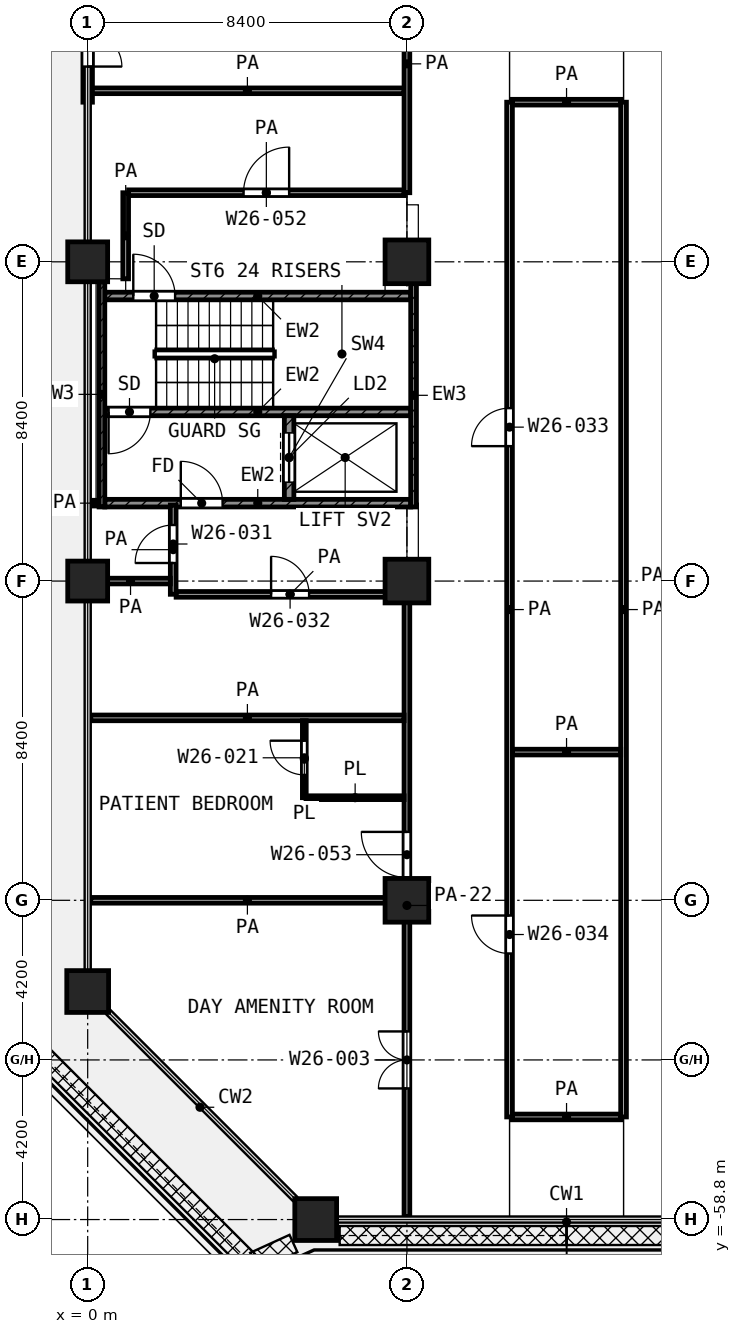
"""IFC4 building model, lengths in metres.
Left out: names, types, materials, properties, quantities, classifications, styles, units other than length and angle.
Written with IfcOpenShell. Run it as: python <this file> out.ifc"""

import sys

from ifc_helpers import new_model, si_unit, direction, frame, frame_2d, origin, origin_2d, place, context, subcontext, project, spatial, rectangle, extrude, element, fill, save


model = new_model("IFC4")
c1 = context("Model", 3, precision=1e-05, world=origin(), true_north=direction((0.0, 1.0)))
c2 = subcontext(c1, "Body", "Model", "MODEL_VIEW")
j1 = project(units=[si_unit("LENGTHUNIT", "METRE"), si_unit("PLANEANGLEUNIT", "RADIAN")], contexts=[c1])
p1 = place(None, origin())
s1 = spatial("IfcSite", under=j1, at=p1, CompositionType="ELEMENT")
p2 = place(p1, origin())
s2 = spatial("IfcBuilding", under=s1, at=p2, CompositionType="ELEMENT")
p3 = place(p2, frame((0.0, 0.0, 136.6)))
s3 = spatial("IfcBuildingStorey", under=s2, at=p3, CompositionType="ELEMENT", Elevation=136.6)
p4 = place(p3, frame((0.0, -33.6, 0.0), z_axis=(0.0, 0.0, 1.0), x_axis=(1.0, 0.0, 0.0)))
e1 = element("IfcColumn", 1, at=p4, inside=s3, PredefinedType="COLUMN", context=c2, shape_type="SweptSolid", body=[
    extrude(rectangle(XDim=1.05, YDim=1.05, at=origin_2d()), origin(), (0.0, 0.0, 1.0), 4.2),
])
p5 = place(p3, frame((8.4, -33.6, 0.0), z_axis=(0.0, 0.0, 1.0), x_axis=(1.0, 0.0, 0.0)))
e2 = element("IfcColumn", 2, at=p5, inside=s3, PredefinedType="COLUMN", context=c2, shape_type="SweptSolid", body=[
    extrude(rectangle(XDim=1.15, YDim=1.15, at=origin_2d()), origin(), (0.0, 0.0, 1.0), 4.2),
])
p6 = place(p3, frame((0.0, -42.0, 0.0), z_axis=(0.0, 0.0, 1.0), x_axis=(1.0, 0.0, 0.0)))
e3 = element("IfcColumn", 3, at=p6, inside=s3, PredefinedType="COLUMN", context=c2, shape_type="SweptSolid", body=[
    extrude(rectangle(XDim=1.05, YDim=1.05, at=origin_2d()), origin(), (0.0, 0.0, 1.0), 4.2),
])
for number, where, z_axis, x_axis in (
    (4, (8.4, -42.0, 0.0), (0.0, 0.0, 1.0), (1.0, 0.0, 0.0)),
    (5, (8.4, -50.4, 0.0), (0.0, 0.0, 1.0), (1.0, 0.0, 0.0)),
):
    element("IfcColumn", number, at=place(p3, frame(where, z_axis=z_axis, x_axis=x_axis)), inside=s3, PredefinedType="COLUMN", context=c2, shape_type="SweptSolid", body=[
        extrude(rectangle(XDim=1.15, YDim=1.15, at=origin_2d()), origin(), (0.0, 0.0, 1.0), 4.2),
    ])
for number, where, z_axis, x_axis in (
    (6, (0.0, -52.8, 0.0), (0.0, 0.0, 1.0), (1.0, 0.0, 0.0)),
    (7, (6.0, -58.8, 0.0), (0.0, 0.0, 1.0), (1.0, 0.0, 0.0)),
):
    element("IfcColumn", number, at=place(p3, frame(where, z_axis=z_axis, x_axis=x_axis)), inside=s3, PredefinedType="COLUMN", context=c2, shape_type="SweptSolid", body=[
        extrude(rectangle(XDim=1.1, YDim=1.1, at=origin_2d()), origin(), (0.0, 0.0, 1.0), 4.2),
    ])
p7 = place(p3, frame((0.0, -25.725, 0.0), z_axis=(0.0, 0.0, 1.0), x_axis=(0.0, -1.0, 0.0)))
e8 = element("IfcWall", 8, at=p7, inside=s3, PredefinedType="SOLIDWALL", context=c2, shape_type="SweptSolid", body=[
    extrude(rectangle(XDim=3.675, YDim=0.25, at=frame_2d((1.837, 0.0))), origin(), (0.0, 0.0, 1.0), 3.48),
])
p8 = place(p7, frame((0.938, 0.0, 0.0)))
e9 = element("IfcOpeningElement", 9, at=p8, cuts=e8, PredefinedType="OPENING", context=c2, shape_type="SweptSolid", body=[
    extrude(rectangle(XDim=1.8, YDim=2.1, at=frame_2d((0.9, 1.05))), frame((0.0, 0.135, 0.0), z_axis=(0.0, -1.0, 0.0), x_axis=(1.0, 0.0, 0.0)), (0.0, 0.0, 1.0), 0.27),
])
p9 = place(p3, frame((0.375, -40.05, 0.0), z_axis=(0.0, 0.0, 1.0), x_axis=(0.0, 1.0, 0.0)))
e10 = element("IfcWall", 10, at=p9, inside=s3, PredefinedType="SHEAR", context=c2, shape_type="SweptSolid", body=[
    extrude(rectangle(XDim=5.925, YDim=0.15, at=frame_2d((2.962, 0.0))), origin(), (0.0, 0.0, 1.0), 3.6),
])
p10 = place(p3, frame((8.575, -40.05, 0.0), z_axis=(0.0, 0.0, 1.0), x_axis=(0.0, 1.0, 0.0)))
e11 = element("IfcWall", 11, at=p10, inside=s3, PredefinedType="SHEAR", context=c2, shape_type="SweptSolid", body=[
    extrude(rectangle(XDim=5.875, YDim=0.15, at=frame_2d((2.938, 0.0))), origin(), (0.0, 0.0, 1.0), 3.6),
])
p11 = place(p3, frame((0.45, -34.5, 0.0), z_axis=(0.0, 0.0, 1.0), x_axis=(1.0, 0.0, 0.0)))
e12 = element("IfcWall", 12, at=p11, inside=s3, PredefinedType="SHEAR", context=c2, shape_type="SweptSolid", body=[
    extrude(rectangle(XDim=8.05, YDim=0.2, at=frame_2d((4.025, 0.0))), origin(), (0.0, 0.0, 1.0), 3.6),
])
p12 = place(p11, frame((0.75, 0.0, 0.0)))
e13 = element("IfcOpeningElement", 13, at=p12, cuts=e12, PredefinedType="OPENING", context=c2, shape_type="SweptSolid", body=[
    extrude(rectangle(XDim=1.1, YDim=2.1, at=frame_2d((0.55, 1.05))), frame((0.0, 0.11, 0.0), z_axis=(0.0, -1.0, 0.0), x_axis=(1.0, 0.0, 0.0)), (0.0, 0.0, 1.0), 0.22),
])
p13 = place(p3, frame((0.45, -37.55, 0.0), z_axis=(0.0, 0.0, 1.0), x_axis=(1.0, 0.0, 0.0)))
e14 = element("IfcWall", 14, at=p13, inside=s3, PredefinedType="SHEAR", context=c2, shape_type="SweptSolid", body=[
    extrude(rectangle(XDim=8.05, YDim=0.2, at=frame_2d((4.025, 0.0))), origin(), (0.0, 0.0, 1.0), 3.6),
])
p14 = place(p13, frame((0.1, 0.0, 0.0)))
e15 = element("IfcOpeningElement", 15, at=p14, cuts=e14, PredefinedType="OPENING", context=c2, shape_type="SweptSolid", body=[
    extrude(rectangle(XDim=1.1, YDim=2.1, at=frame_2d((0.55, 1.05))), frame((0.0, 0.11, 0.0), z_axis=(0.0, -1.0, 0.0), x_axis=(1.0, 0.0, 0.0)), (0.0, 0.0, 1.0), 0.22),
])
p15 = place(p3, frame((0.45, -39.95, 0.0), z_axis=(0.0, 0.0, 1.0), x_axis=(1.0, 0.0, 0.0)))
e16 = element("IfcWall", 16, at=p15, inside=s3, PredefinedType="SHEAR", context=c2, shape_type="SweptSolid", body=[
    extrude(rectangle(XDim=8.05, YDim=0.2, at=frame_2d((4.025, 0.0))), origin(), (0.0, 0.0, 1.0), 3.6),
])
p16 = place(p15, frame((2.0, 0.0, 0.0)))
e17 = element("IfcOpeningElement", 17, at=p16, cuts=e16, PredefinedType="OPENING", context=c2, shape_type="SweptSolid", body=[
    extrude(rectangle(XDim=1.1, YDim=2.1, at=frame_2d((0.55, 1.05))), frame((0.0, 0.11, 0.0), z_axis=(0.0, -1.0, 0.0), x_axis=(1.0, 0.0, 0.0)), (0.0, 0.0, 1.0), 0.22),
])
p17 = place(p3, frame((5.3, -39.85, 0.0), z_axis=(0.0, 0.0, 1.0), x_axis=(0.0, 1.0, 0.0)))
e18 = element("IfcWall", 18, at=p17, inside=s3, PredefinedType="SHEAR", context=c2, shape_type="SweptSolid", body=[
    extrude(rectangle(XDim=2.2, YDim=0.25, at=frame_2d((1.1, 0.0))), origin(), (0.0, 0.0, 1.0), 3.6),
])
p18 = place(p17, frame((0.45, 0.0, 0.0)))
e19 = element("IfcOpeningElement", 19, at=p18, cuts=e18, PredefinedType="OPENING", context=c2, shape_type="SweptSolid", body=[
    extrude(rectangle(XDim=1.3, YDim=2.1, at=frame_2d((0.65, 1.05))), frame((0.0, 0.135, 0.0), z_axis=(0.0, -1.0, 0.0), x_axis=(1.0, 0.0, 0.0)), (0.0, 0.0, 1.0), 0.27),
])
p19 = place(p3, frame((5.75, -47.7, 0.0), z_axis=(0.0, 0.0, 1.0), x_axis=(1.0, 0.0, 0.0)))
e20 = element("IfcWall", 20, at=p19, inside=s3, PredefinedType="PARTITIONING", context=c2, shape_type="SweptSolid", body=[
    extrude(rectangle(XDim=2.575, YDim=0.1, at=frame_2d((1.288, 0.0))), origin(), (0.0, 0.0, 1.0), 3.6),
])
p20 = place(p3, frame((5.7, -47.7, 0.0), z_axis=(0.0, 0.0, 1.0), x_axis=(0.0, 1.0, 0.0)))
e21 = element("IfcWall", 21, at=p20, inside=s3, PredefinedType="PARTITIONING", context=c2, shape_type="SweptSolid", body=[
    extrude(rectangle(XDim=2.025, YDim=0.1, at=frame_2d((1.012, 0.0))), origin(), (0.0, 0.0, 1.0), 3.6),
])
p21 = place(p20, frame((0.6, 0.0, 0.0)))
e22 = element("IfcOpeningElement", 22, at=p21, cuts=e21, PredefinedType="OPENING", context=c2, shape_type="SweptSolid", body=[
    extrude(rectangle(XDim=0.9, YDim=2.1, at=frame_2d((0.45, 1.05))), frame((0.0, 0.06, 0.0), z_axis=(0.0, -1.0, 0.0), x_axis=(1.0, 0.0, 0.0)), (0.0, 0.0, 1.0), 0.12),
])
p22 = place(p3, frame((11.175, -56.1, 0.0), z_axis=(0.0, 0.0, 1.0), x_axis=(1.0, 0.0, 0.0)))
e23 = element("IfcWall", 23, at=p22, inside=s3, PredefinedType="PARTITIONING", context=c2, shape_type="SweptSolid", body=[
    extrude(rectangle(XDim=2.85, YDim=0.15, at=frame_2d((1.425, 0.0))), origin(), (0.0, 0.0, 1.0), 3.6),
])
p23 = place(p3, frame((0.08, -50.4, 0.0), z_axis=(0.0, 0.0, 1.0), x_axis=(1.0, 0.0, 0.0)))
e24 = element("IfcWall", 24, at=p23, inside=s3, PredefinedType="PARTITIONING", context=c2, shape_type="SweptSolid", body=[
    extrude(rectangle(XDim=8.245, YDim=0.15, at=frame_2d((4.123, 0.0))), origin(), (0.0, 0.0, 1.0), 3.6),
])
p24 = place(p3, frame((11.175, -46.5, 0.0), z_axis=(0.0, 0.0, 1.0), x_axis=(1.0, 0.0, 0.0)))
e25 = element("IfcWall", 25, at=p24, inside=s3, PredefinedType="PARTITIONING", context=c2, shape_type="SweptSolid", body=[
    extrude(rectangle(XDim=2.85, YDim=0.15, at=frame_2d((1.425, 0.0))), origin(), (0.0, 0.0, 1.0), 3.6),
])
p25 = place(p3, frame((0.08, -45.6, 0.0), z_axis=(0.0, 0.0, 1.0), x_axis=(1.0, 0.0, 0.0)))
e26 = element("IfcWall", 26, at=p25, inside=s3, PredefinedType="PARTITIONING", context=c2, shape_type="SweptSolid", body=[
    extrude(rectangle(XDim=8.245, YDim=0.15, at=frame_2d((4.123, 0.0))), origin(), (0.0, 0.0, 1.0), 3.6),
])
p26 = place(p3, frame((2.327, -42.35, 0.0), z_axis=(0.0, 0.0, 1.0), x_axis=(1.0, 0.0, 0.0)))
e27 = element("IfcWall", 27, at=p26, inside=s3, PredefinedType="PARTITIONING", context=c2, shape_type="SweptSolid", body=[
    extrude(rectangle(XDim=5.998, YDim=0.15, at=frame_2d((2.999, 0.0))), origin(), (0.0, 0.0, 1.0), 3.6),
])
p27 = place(p26, frame((2.499, 0.0, 0.0)))
e28 = element("IfcOpeningElement", 28, at=p27, cuts=e27, PredefinedType="OPENING", context=c2, shape_type="SweptSolid", body=[
    extrude(rectangle(XDim=1.0, YDim=2.1, at=frame_2d((0.5, 1.05))), frame((0.0, 0.085, 0.0), z_axis=(0.0, -1.0, 0.0), x_axis=(1.0, 0.0, 0.0)), (0.0, 0.0, 1.0), 0.17),
])
p28 = place(p3, frame((0.08, -42.0, 0.0), z_axis=(0.0, 0.0, 1.0), x_axis=(1.0, 0.0, 0.0)))
e29 = element("IfcWall", 29, at=p28, inside=s3, PredefinedType="PARTITIONING", context=c2, shape_type="SweptSolid", body=[
    extrude(rectangle(XDim=2.095, YDim=0.15, at=frame_2d((1.047, 0.0))), origin(), (0.0, 0.0, 1.0), 3.6),
])
p29 = place(p3, frame((0.08, -39.95, 0.0), z_axis=(0.0, 0.0, 1.0), x_axis=(1.0, 0.0, 0.0)))
e30 = element("IfcWall", 30, at=p29, inside=s3, PredefinedType="PARTITIONING", context=c2, shape_type="SweptSolid", body=[
    extrude(rectangle(XDim=0.19, YDim=0.15, at=frame_2d((0.095, 0.0))), origin(), (0.0, 0.0, 1.0), 3.6),
])
p30 = place(p3, frame((1.077, -31.782, 0.0), z_axis=(0.0, 0.0, 1.0), x_axis=(1.0, 0.0, 0.0)))
e31 = element("IfcWall", 31, at=p30, inside=s3, PredefinedType="PARTITIONING", context=c2, shape_type="SweptSolid", body=[
    extrude(rectangle(XDim=7.248, YDim=0.15, at=frame_2d((3.624, 0.0))), origin(), (0.0, 0.0, 1.0), 3.6),
])
p31 = place(p30, frame((3.024, 0.0, 0.0)))
e32 = element("IfcOpeningElement", 32, at=p31, cuts=e31, PredefinedType="OPENING", context=c2, shape_type="SweptSolid", body=[
    extrude(rectangle(XDim=1.2, YDim=2.1, at=frame_2d((0.6, 1.05))), frame((0.0, 0.085, 0.0), z_axis=(0.0, -1.0, 0.0), x_axis=(1.0, 0.0, 0.0)), (0.0, 0.0, 1.0), 0.17),
])
p32 = place(p3, frame((11.175, -29.4, 0.0), z_axis=(0.0, 0.0, 1.0), x_axis=(1.0, 0.0, 0.0)))
e33 = element("IfcWall", 33, at=p32, inside=s3, PredefinedType="PARTITIONING", context=c2, shape_type="SweptSolid", body=[
    extrude(rectangle(XDim=2.85, YDim=0.15, at=frame_2d((1.425, 0.0))), origin(), (0.0, 0.0, 1.0), 3.6),
])
p33 = place(p3, frame((0.08, -29.1, 0.0), z_axis=(0.0, 0.0, 1.0), x_axis=(1.0, 0.0, 0.0)))
e34 = element("IfcWall", 34, at=p33, inside=s3, PredefinedType="PARTITIONING", context=c2, shape_type="SweptSolid", body=[
    extrude(rectangle(XDim=8.245, YDim=0.15, at=frame_2d((4.123, 0.0))), origin(), (0.0, 0.0, 1.0), 3.6),
])
p34 = place(p3, frame((1.0, -34.048, 0.0), z_axis=(0.0, 0.0, 1.0), x_axis=(0.0, 1.0, 0.0)))
e35 = element("IfcWall", 35, at=p34, inside=s3, PredefinedType="PARTITIONING", context=c2, shape_type="SweptSolid", body=[
    extrude(rectangle(XDim=2.265, YDim=0.15, at=frame_2d((1.133, 0.0))), origin(), (0.0, 0.0, 1.0), 3.6),
])
p35 = place(p3, frame((2.25, -42.348, 0.0), z_axis=(0.0, 0.0, 1.0), x_axis=(0.0, 1.0, 0.0)))
e36 = element("IfcWall", 36, at=p35, inside=s3, PredefinedType="PARTITIONING", context=c2, shape_type="SweptSolid", body=[
    extrude(rectangle(XDim=2.348, YDim=0.15, at=frame_2d((1.174, 0.0))), origin(), (0.0, 0.0, 1.0), 3.6),
])
p36 = place(p35, frame((0.823, 0.0, 0.0)))
e37 = element("IfcOpeningElement", 37, at=p36, cuts=e36, PredefinedType="OPENING", context=c2, shape_type="SweptSolid", body=[
    extrude(rectangle(XDim=1.0, YDim=2.1, at=frame_2d((0.5, 1.05))), frame((0.0, 0.085, 0.0), z_axis=(0.0, -1.0, 0.0), x_axis=(1.0, 0.0, 0.0)), (0.0, 0.0, 1.0), 0.17),
])
p37 = place(p3, frame((8.4, -58.72, 0.0), z_axis=(0.0, 0.0, 1.0), x_axis=(0.0, 1.0, 0.0)))
e38 = element("IfcWall", 38, at=p37, inside=s3, PredefinedType="PARTITIONING", context=c2, shape_type="SweptSolid", body=[
    extrude(rectangle(XDim=16.37, YDim=0.15, at=frame_2d((8.185, 0.0))), origin(), (0.0, 0.0, 1.0), 2.7),
])
p38 = place(p37, frame((8.92, 0.0, 0.0)))
e39 = element("IfcOpeningElement", 39, at=p38, cuts=e38, PredefinedType="OPENING", context=c2, shape_type="SweptSolid", body=[
    extrude(rectangle(XDim=1.2, YDim=2.1, at=frame_2d((0.6, 1.05))), frame((0.0, 0.085, 0.0), z_axis=(0.0, -1.0, 0.0), x_axis=(1.0, 0.0, 0.0)), (0.0, 0.0, 1.0), 0.17),
])
p39 = place(p37, frame((3.37, 0.0, 0.0)))
e40 = element("IfcOpeningElement", 40, at=p39, cuts=e38, PredefinedType="OPENING", context=c2, shape_type="SweptSolid", body=[
    extrude(rectangle(XDim=1.5, YDim=2.1, at=frame_2d((0.75, 1.05))), frame((0.0, 0.085, 0.0), z_axis=(0.0, -1.0, 0.0), x_axis=(1.0, 0.0, 0.0)), (0.0, 0.0, 1.0), 0.17),
])
p40 = place(p3, frame((8.4, -31.782, 0.0), z_axis=(0.0, 0.0, 1.0), x_axis=(0.0, 1.0, 0.0)))
e41 = element("IfcWall", 41, at=p40, inside=s3, PredefinedType="PARTITIONING", context=c2, shape_type="SweptSolid", body=[
    extrude(rectangle(XDim=6.782, YDim=0.15, at=frame_2d((3.391, 0.0))), origin(), (0.0, 0.0, 1.0), 3.6),
])
p41 = place(p40, frame((4.182, 0.0, 0.0)))
e42 = element("IfcOpeningElement", 42, at=p41, cuts=e41, PredefinedType="OPENING", context=c2, shape_type="SweptSolid", body=[
    extrude(rectangle(XDim=0.9, YDim=2.1, at=frame_2d((0.45, 1.05))), frame((0.0, 0.085, 0.0), z_axis=(0.0, -1.0, 0.0), x_axis=(1.0, 0.0, 0.0)), (0.0, 0.0, 1.0), 0.17),
])
p42 = place(p3, frame((11.1, -56.1, 0.0), z_axis=(0.0, 0.0, 1.0), x_axis=(0.0, 1.0, 0.0)))
e43 = element("IfcWall", 43, at=p42, inside=s3, PredefinedType="PARTITIONING", context=c2, shape_type="SweptSolid", body=[
    extrude(rectangle(XDim=26.7, YDim=0.15, at=frame_2d((13.35, 0.0))), origin(), (0.0, 0.0, 1.0), 3.6),
])
p43 = place(p42, frame((17.65, 0.0, 0.0)))
e44 = element("IfcOpeningElement", 44, at=p43, cuts=e43, PredefinedType="OPENING", context=c2, shape_type="SweptSolid", body=[
    extrude(rectangle(XDim=1.0, YDim=2.1, at=frame_2d((0.5, 1.05))), frame((0.0, 0.085, 0.0), z_axis=(0.0, -1.0, 0.0), x_axis=(1.0, 0.0, 0.0)), (0.0, 0.0, 1.0), 0.17),
])
p44 = place(p42, frame((4.3, 0.0, 0.0)))
e45 = element("IfcOpeningElement", 45, at=p44, cuts=e43, PredefinedType="OPENING", context=c2, shape_type="SweptSolid", body=[
    extrude(rectangle(XDim=1.0, YDim=2.1, at=frame_2d((0.5, 1.05))), frame((0.0, 0.085, 0.0), z_axis=(0.0, -1.0, 0.0), x_axis=(1.0, 0.0, 0.0)), (0.0, 0.0, 1.0), 0.17),
])
p45 = place(p3, frame((14.1, -56.1, 0.0), z_axis=(0.0, 0.0, 1.0), x_axis=(0.0, 1.0, 0.0)))
e46 = element("IfcWall", 46, at=p45, inside=s3, PredefinedType="PARTITIONING", context=c2, shape_type="SweptSolid", body=[
    extrude(rectangle(XDim=26.7, YDim=0.15, at=frame_2d((13.35, 0.0))), origin(), (0.0, 0.0, 1.0), 3.6),
])
p46 = place(p8, origin())
e47 = element("IfcDoor", 47, at=p46, inside=s3, OperationType="DOUBLE_DOOR_SINGLE_SWING", PredefinedType="DOOR", context=c2, shape_type="SweptSolid", body=[
    extrude(rectangle(XDim=1.8, YDim=2.1, at=frame_2d((0.9, 1.05))), frame((0.0, 0.025, 0.0), z_axis=(0.0, -1.0, 0.0), x_axis=(1.0, 0.0, 0.0)), (0.0, 0.0, 1.0), 0.05),
])
fill(e9, e47)
p47 = place(p12, origin())
e48 = element("IfcDoor", 48, at=p47, inside=s3, OperationType="SINGLE_SWING_LEFT", PredefinedType="DOOR", context=c2, shape_type="SweptSolid", body=[
    extrude(rectangle(XDim=1.1, YDim=2.1, at=frame_2d((0.55, 1.05))), frame((0.0, 0.025, 0.0), z_axis=(0.0, -1.0, 0.0), x_axis=(1.0, 0.0, 0.0)), (0.0, 0.0, 1.0), 0.05),
])
fill(e13, e48)
p48 = place(p14, frame((1.1, 0.0, 0.0), z_axis=(0.0, 0.0, 1.0), x_axis=(-1.0, 0.0, 0.0)))
e49 = element("IfcDoor", 49, at=p48, inside=s3, OperationType="SINGLE_SWING_LEFT", PredefinedType="DOOR", context=c2, shape_type="SweptSolid", body=[
    extrude(rectangle(XDim=1.1, YDim=2.1, at=frame_2d((0.55, 1.05))), frame((0.0, 0.025, 0.0), z_axis=(0.0, -1.0, 0.0), x_axis=(1.0, 0.0, 0.0)), (0.0, 0.0, 1.0), 0.05),
])
fill(e15, e49)
p49 = place(p18, origin())
e50 = element("IfcDoor", 50, at=p49, inside=s3, OperationType="DOUBLE_DOOR_SLIDING", PredefinedType="DOOR", context=c2, shape_type="SweptSolid", body=[
    extrude(rectangle(XDim=1.3, YDim=2.1, at=frame_2d((0.65, 1.05))), frame((0.0, 0.025, 0.0), z_axis=(0.0, -1.0, 0.0), x_axis=(1.0, 0.0, 0.0)), (0.0, 0.0, 1.0), 0.05),
])
fill(e19, e50)
p50 = place(p16, origin())
e51 = element("IfcDoor", 51, at=p50, inside=s3, OperationType="SINGLE_SWING_LEFT", PredefinedType="DOOR", context=c2, shape_type="SweptSolid", body=[
    extrude(rectangle(XDim=1.1, YDim=2.1, at=frame_2d((0.55, 1.05))), frame((0.0, 0.025, 0.0), z_axis=(0.0, -1.0, 0.0), x_axis=(1.0, 0.0, 0.0)), (0.0, 0.0, 1.0), 0.05),
])
fill(e17, e51)
p51 = place(p31, origin())
e52 = element("IfcDoor", 52, at=p51, inside=s3, OperationType="SINGLE_SWING_RIGHT", PredefinedType="DOOR", context=c2, shape_type="SweptSolid", body=[
    extrude(rectangle(XDim=1.2, YDim=2.1, at=frame_2d((0.6, 1.05))), frame((0.0, 0.025, 0.0), z_axis=(0.0, -1.0, 0.0), x_axis=(1.0, 0.0, 0.0)), (0.0, 0.0, 1.0), 0.05),
])
fill(e32, e52)
p52 = place(p36, origin())
e53 = element("IfcDoor", 53, at=p52, inside=s3, OperationType="SINGLE_SWING_LEFT", PredefinedType="DOOR", context=c2, shape_type="SweptSolid", body=[
    extrude(rectangle(XDim=1.0, YDim=2.1, at=frame_2d((0.5, 1.05))), frame((0.0, 0.025, 0.0), z_axis=(0.0, -1.0, 0.0), x_axis=(1.0, 0.0, 0.0)), (0.0, 0.0, 1.0), 0.05),
])
fill(e37, e53)
p53 = place(p27, origin())
e54 = element("IfcDoor", 54, at=p53, inside=s3, OperationType="SINGLE_SWING_LEFT", PredefinedType="DOOR", context=c2, shape_type="SweptSolid", body=[
    extrude(rectangle(XDim=1.0, YDim=2.1, at=frame_2d((0.5, 1.05))), frame((0.0, 0.025, 0.0), z_axis=(0.0, -1.0, 0.0), x_axis=(1.0, 0.0, 0.0)), (0.0, 0.0, 1.0), 0.05),
])
fill(e28, e54)
p54 = place(p38, origin())
e55 = element("IfcDoor", 55, at=p54, inside=s3, OperationType="SINGLE_SWING_RIGHT", PredefinedType="DOOR", context=c2, shape_type="SweptSolid", body=[
    extrude(rectangle(XDim=1.2, YDim=2.1, at=frame_2d((0.6, 1.05))), frame((0.0, 0.025, 0.0), z_axis=(0.0, -1.0, 0.0), x_axis=(1.0, 0.0, 0.0)), (0.0, 0.0, 1.0), 0.05),
])
fill(e39, e55)
p55 = place(p21, origin())
e56 = element("IfcDoor", 56, at=p55, inside=s3, OperationType="SINGLE_SWING_RIGHT", PredefinedType="DOOR", context=c2, shape_type="SweptSolid", body=[
    extrude(rectangle(XDim=0.9, YDim=2.1, at=frame_2d((0.45, 1.05))), frame((0.0, 0.025, 0.0), z_axis=(0.0, -1.0, 0.0), x_axis=(1.0, 0.0, 0.0)), (0.0, 0.0, 1.0), 0.05),
])
fill(e22, e56)
p56 = place(p39, origin())
e57 = element("IfcDoor", 57, at=p56, inside=s3, OperationType="DOUBLE_DOOR_SINGLE_SWING", PredefinedType="DOOR", context=c2, shape_type="SweptSolid", body=[
    extrude(rectangle(XDim=1.5, YDim=2.1, at=frame_2d((0.75, 1.05))), frame((0.0, 0.025, 0.0), z_axis=(0.0, -1.0, 0.0), x_axis=(1.0, 0.0, 0.0)), (0.0, 0.0, 1.0), 0.05),
])
fill(e40, e57)
p57 = place(p43, origin())
e58 = element("IfcDoor", 58, at=p57, inside=s3, OperationType="SINGLE_SWING_LEFT", PredefinedType="DOOR", context=c2, shape_type="SweptSolid", body=[
    extrude(rectangle(XDim=1.0, YDim=2.1, at=frame_2d((0.5, 1.05))), frame((0.0, 0.025, 0.0), z_axis=(0.0, -1.0, 0.0), x_axis=(1.0, 0.0, 0.0)), (0.0, 0.0, 1.0), 0.05),
])
fill(e44, e58)
p58 = place(p44, origin())
e59 = element("IfcDoor", 59, at=p58, inside=s3, OperationType="SINGLE_SWING_RIGHT", PredefinedType="DOOR", context=c2, shape_type="SweptSolid", body=[
    extrude(rectangle(XDim=1.0, YDim=2.1, at=frame_2d((0.5, 1.05))), frame((0.0, 0.025, 0.0), z_axis=(0.0, -1.0, 0.0), x_axis=(1.0, 0.0, 0.0)), (0.0, 0.0, 1.0), 0.05),
])
fill(e45, e59)
save(model, sys.argv[1])
